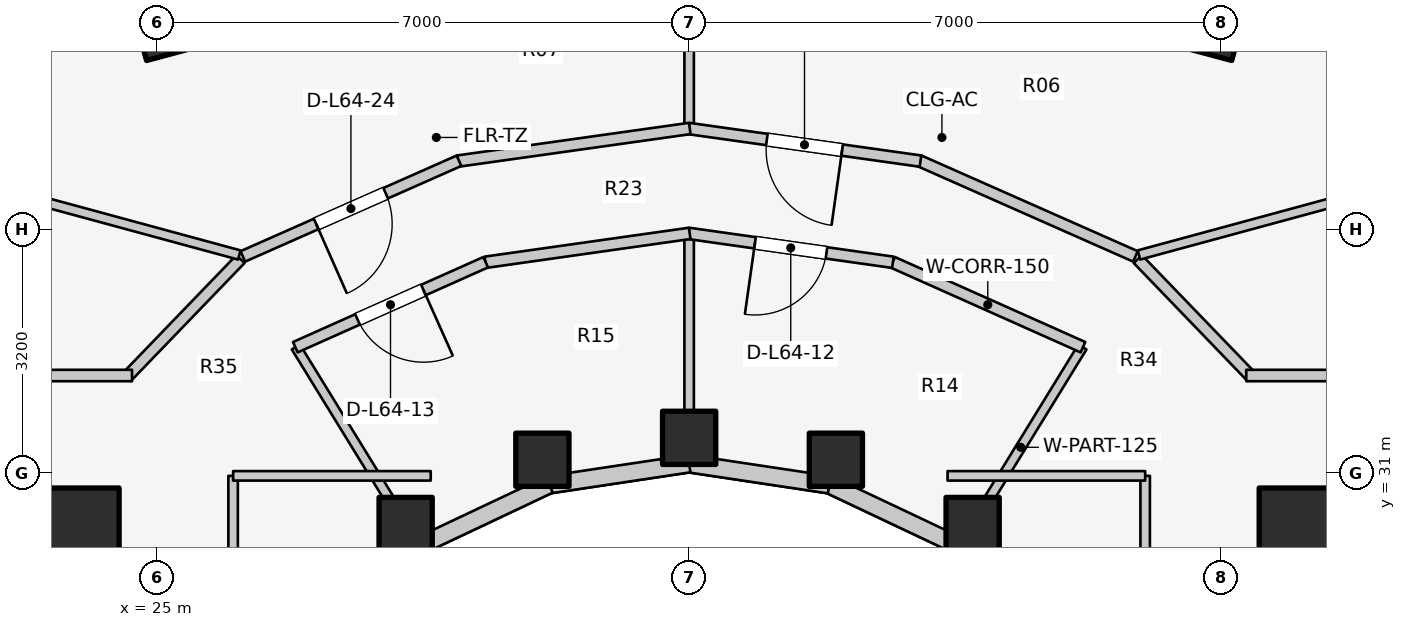
"""IFC4 building model, lengths in metres.
Left out: names, types, materials, properties, quantities, classifications, styles, units other than length and angle.
Written with IfcOpenShell. Run it as: python <this file> out.ifc"""

import sys

from ifc_helpers import new_model, si_unit, direction, frame, frame_2d, origin, origin_2d, place, context, subcontext, project, spatial, rectangle, extrude, element, fill, save


model = new_model("IFC4")
c1 = context("Model", 3, precision=1e-05, world=origin(), true_north=direction((0.0, 1.0)))
c2 = subcontext(c1, "Body", "Model", "MODEL_VIEW")
j1 = project(units=[si_unit("LENGTHUNIT", "METRE"), si_unit("PLANEANGLEUNIT", "RADIAN")], contexts=[c1])
p1 = place(None, origin())
s1 = spatial("IfcSite", under=j1, at=p1, CompositionType="ELEMENT")
p2 = place(p1, origin())
s2 = spatial("IfcBuilding", under=s1, at=p2, CompositionType="ELEMENT")
p3 = place(p2, frame((0.0, 0.0, 210.9)))
s3 = spatial("IfcBuildingStorey", under=s2, at=p3, CompositionType="ELEMENT", Elevation=210.9)
for number, where, z_axis, x_axis in (
    (1, (19.65, 30.35, 0.0), (0.0, 0.0, 1.0), (1.0, 0.0, 0.0)),
    (2, (39.85, 30.35, 0.0), (0.0, 0.0, 1.0), (1.0, 0.0, 0.0)),
):
    element("IfcWall", number, at=place(p3, frame(where, z_axis=z_axis, x_axis=x_axis)), inside=s3, PredefinedType="SHEAR", context=c2, shape_type="SweptSolid", body=[
        extrude(rectangle(XDim=4.5, YDim=0.55, at=frame_2d((2.25, 0.0))), origin(), (0.0, 0.0, 1.0), 3.1),
    ])
for number, where, z_axis, x_axis in (
    (3, (23.9, 30.2, 0.0), (0.0, 0.0, 1.0), (1.0, 0.0, 0.0)),
    (4, (40.1, 30.2, 0.0), (0.0, 0.0, 1.0), (1.0, 0.0, 0.0)),
):
    element("IfcColumn", number, at=place(p3, frame(where, z_axis=z_axis, x_axis=x_axis)), inside=s3, PredefinedType="COLUMN", context=c2, shape_type="SweptSolid", body=[
        extrude(rectangle(XDim=1.2, YDim=1.2, at=origin_2d()), origin(), (0.0, 0.0, 1.0), 3.1),
    ])
for number, where, z_axis, x_axis in (
    (5, (35.73, 30.327, 0.0), (0.0, 0.0, 1.0), (1.0, 0.0, 0.0)),
    (6, (33.931, 31.172, 0.0), (0.0, 0.0, 1.0), (1.0, 0.0, 0.0)),
):
    element("IfcColumn", number, at=place(p3, frame(where, z_axis=z_axis, x_axis=x_axis)), inside=s3, PredefinedType="COLUMN", context=c2, shape_type="SweptSolid", body=[
        extrude(rectangle(XDim=0.7, YDim=0.7, at=origin_2d()), origin(), (0.0, 0.0, 1.0), 3.1),
    ])
p4 = place(p3, frame((38.856, 36.914, 0.0), z_axis=(0.0, 0.0, 1.0), x_axis=(0.258819045103, 0.965925826289, 0.0)))
e7 = element("IfcColumn", 7, at=p4, inside=s3, PredefinedType="COLUMN", context=c2, shape_type="SweptSolid", body=[
    extrude(rectangle(XDim=0.8, YDim=0.8, at=origin_2d()), origin(), (0.0, 0.0, 1.0), 3.1),
])
for number, where, z_axis, x_axis in (
    (8, (32.0, 31.46, 0.0), (0.0, 0.0, 1.0), (1.0, 0.0, 0.0)),
    (9, (30.069, 31.172, 0.0), (0.0, 0.0, 1.0), (1.0, 0.0, 0.0)),
):
    element("IfcColumn", number, at=place(p3, frame(where, z_axis=z_axis, x_axis=x_axis)), inside=s3, PredefinedType="COLUMN", context=c2, shape_type="SweptSolid", body=[
        extrude(rectangle(XDim=0.7, YDim=0.7, at=origin_2d()), origin(), (0.0, 0.0, 1.0), 3.1),
    ])
p5 = place(p3, frame((25.144, 36.914, 0.0), z_axis=(0.0, 0.0, 1.0), x_axis=(-0.258819045103, 0.965925826289, 0.0)))
e10 = element("IfcColumn", 10, at=p5, inside=s3, PredefinedType="COLUMN", context=c2, shape_type="SweptSolid", body=[
    extrude(rectangle(XDim=0.8, YDim=0.8, at=origin_2d()), origin(), (0.0, 0.0, 1.0), 3.1),
])
p6 = place(p3, frame((28.27, 30.327, 0.0), z_axis=(0.0, 0.0, 1.0), x_axis=(1.0, 0.0, 0.0)))
e11 = element("IfcColumn", 11, at=p6, inside=s3, PredefinedType="COLUMN", context=c2, shape_type="SweptSolid", body=[
    extrude(rectangle(XDim=0.7, YDim=0.7, at=origin_2d()), origin(), (0.0, 0.0, 1.0), 3.1),
])
p7 = place(p3, frame((37.035, 28.742, 0.0), z_axis=(0.0, 0.0, 1.0), x_axis=(-0.752576694707, 0.658504607869, 0.0)))
e12 = element("IfcWall", 12, at=p7, inside=s3, PredefinedType="STANDARD", context=c2, shape_type="SweptSolid", body=[
    extrude(rectangle(XDim=1.959, YDim=0.23, at=frame_2d((0.98, 0.0))), origin(), (0.0, 0.0, 1.0), 2.16),
])
p8 = place(p3, frame((35.56, 30.032, 0.0), z_axis=(0.0, 0.0, 1.0), x_axis=(-0.904179699603, 0.427152280606, 0.0)))
e13 = element("IfcWall", 13, at=p8, inside=s3, PredefinedType="STANDARD", context=c2, shape_type="SweptSolid", body=[
    extrude(rectangle(XDim=1.899, YDim=0.23, at=frame_2d((0.95, 0.0))), origin(), (0.0, 0.0, 1.0), 2.16),
])
for number, where, z_axis, x_axis in (
    (14, (33.843, 30.843, 0.0), (0.0, 0.0, 1.0), (-0.989, 0.149, 0.0)),
    (15, (32.0, 31.12, 0.0), (0.0, 0.0, 1.0), (-0.989, -0.149, 0.0)),
):
    element("IfcWall", number, at=place(p3, frame(where, z_axis=z_axis, x_axis=x_axis)), inside=s3, PredefinedType="STANDARD", context=c2, shape_type="SweptSolid", body=[
        extrude(rectangle(XDim=1.864, YDim=0.23, at=frame_2d((0.932, 0.0))), origin(), (0.0, 0.0, 1.0), 2.16),
    ])
p9 = place(p3, frame((30.157, 30.843, 0.0), z_axis=(0.0, 0.0, 1.0), x_axis=(-0.904179699603, -0.427152280606, 0.0)))
e16 = element("IfcWall", 16, at=p9, inside=s3, PredefinedType="STANDARD", context=c2, shape_type="SweptSolid", body=[
    extrude(rectangle(XDim=1.899, YDim=0.23, at=frame_2d((0.95, 0.0))), origin(), (0.0, 0.0, 1.0), 2.16),
])
p10 = place(p3, frame((28.44, 30.032, 0.0), z_axis=(0.0, 0.0, 1.0), x_axis=(-0.752576694707, -0.658504607869, 0.0)))
e17 = element("IfcWall", 17, at=p10, inside=s3, PredefinedType="STANDARD", context=c2, shape_type="SweptSolid", body=[
    extrude(rectangle(XDim=1.959, YDim=0.23, at=frame_2d((0.98, 0.0))), origin(), (0.0, 0.0, 1.0), 2.16),
])
p11 = place(p3, frame((43.87, 36.177, 0.0), z_axis=(0.0, 0.0, 1.0), x_axis=(-0.965213026382, 0.261464746576, 0.0)))
e18 = element("IfcWall", 18, at=p11, inside=s3, PredefinedType="STANDARD", context=c2, shape_type="SweptSolid", body=[
    extrude(rectangle(XDim=5.001, YDim=0.26, at=frame_2d((2.5, 0.0))), origin(), (0.0, 0.0, 1.0), 2.85),
])
p12 = place(p11, frame((1.75, 0.0, 0.75)))
e19 = element("IfcOpeningElement", 19, at=p12, cuts=e18, PredefinedType="OPENING", context=c2, shape_type="SweptSolid", body=[
    extrude(rectangle(XDim=1.5, YDim=1.6, at=frame_2d((0.75, 0.8))), frame((0.0, 0.14, 0.0), z_axis=(0.0, -1.0, 0.0), x_axis=(1.0, 0.0, 0.0)), (0.0, 0.0, 1.0), 0.28),
])
p13 = place(p3, frame((24.957, 37.485, 0.0), z_axis=(0.0, 0.0, 1.0), x_axis=(-0.965213026382, -0.261464746576, 0.0)))
e20 = element("IfcWall", 20, at=p13, inside=s3, PredefinedType="STANDARD", context=c2, shape_type="SweptSolid", body=[
    extrude(rectangle(XDim=5.001, YDim=0.26, at=frame_2d((2.5, 0.0))), origin(), (0.0, 0.0, 1.0), 2.85),
])
p14 = place(p13, frame((1.75, 0.0, 0.75)))
e21 = element("IfcOpeningElement", 21, at=p14, cuts=e20, PredefinedType="OPENING", context=c2, shape_type="SweptSolid", body=[
    extrude(rectangle(XDim=1.5, YDim=1.6, at=frame_2d((0.75, 0.8))), frame((0.0, 0.14, 0.0), z_axis=(0.0, -1.0, 0.0), x_axis=(1.0, 0.0, 0.0)), (0.0, 0.0, 1.0), 0.28),
])
p15 = place(p3, frame((35.55, 30.015, 0.0), z_axis=(0.0, 0.0, 1.0), x_axis=(0.523992004803, 0.851723182086, 0.0)))
e22 = element("IfcWall", 22, at=p15, inside=s3, PredefinedType="PARTITIONING", context=c2, shape_type="SweptSolid", body=[
    extrude(rectangle(XDim=3.101, YDim=0.125, at=frame_2d((1.551, 0.0))), origin(), (0.0, 0.0, 1.0), 2.376),
])
p16 = place(p3, frame((32.0, 31.1, 0.0), z_axis=(0.0, 0.0, 1.0), x_axis=(0.0, 1.0, 0.0)))
e23 = element("IfcWall", 23, at=p16, inside=s3, PredefinedType="PARTITIONING", context=c2, shape_type="SweptSolid", body=[
    extrude(rectangle(XDim=3.05, YDim=0.125, at=frame_2d((1.525, 0.0))), origin(), (0.0, 0.0, 1.0), 2.376),
])
p17 = place(p3, frame((28.45, 30.015, 0.0), z_axis=(0.0, 0.0, 1.0), x_axis=(-0.523992004803, 0.851723182086, 0.0)))
e24 = element("IfcWall", 24, at=p17, inside=s3, PredefinedType="PARTITIONING", context=c2, shape_type="SweptSolid", body=[
    extrude(rectangle(XDim=3.101, YDim=0.125, at=frame_2d((1.551, 0.0))), origin(), (0.0, 0.0, 1.0), 2.376),
])
p18 = place(p3, frame((37.181, 32.652, 0.0), z_axis=(0.0, 0.0, 1.0), x_axis=(-0.913120130558, 0.407690602257, 0.0)))
e25 = element("IfcWall", 25, at=p18, inside=s3, PredefinedType="PARTITIONING", context=c2, shape_type="SweptSolid", body=[
    extrude(rectangle(XDim=2.743, YDim=0.15, at=frame_2d((1.371, 0.0))), origin(), (0.0, 0.0, 1.0), 2.376),
])
p19 = place(p3, frame((34.68, 33.77, 0.0), z_axis=(0.0, 0.0, 1.0), x_axis=(-0.990132151456, 0.140136799779, 0.0)))
e26 = element("IfcWall", 26, at=p19, inside=s3, PredefinedType="PARTITIONING", context=c2, shape_type="SweptSolid", body=[
    extrude(rectangle(XDim=2.714, YDim=0.15, at=frame_2d((1.357, 0.0))), origin(), (0.0, 0.0, 1.0), 2.376),
])
p20 = place(p19, frame((0.882, 0.0, 0.0)))
e27 = element("IfcOpeningElement", 27, at=p20, cuts=e26, PredefinedType="OPENING", context=c2, shape_type="SweptSolid", body=[
    extrude(rectangle(XDim=0.95, YDim=2.1, at=frame_2d((0.475, 1.05))), frame((0.0, 0.085, 0.0), z_axis=(0.0, -1.0, 0.0), x_axis=(1.0, 0.0, 0.0)), (0.0, 0.0, 1.0), 0.17),
])
p21 = place(p3, frame((32.007, 34.15, 0.0), z_axis=(0.0, 0.0, 1.0), x_axis=(-0.990132151456, -0.140136799779, 0.0)))
e28 = element("IfcWall", 28, at=p21, inside=s3, PredefinedType="PARTITIONING", context=c2, shape_type="SweptSolid", body=[
    extrude(rectangle(XDim=2.714, YDim=0.15, at=frame_2d((1.357, 0.0))), origin(), (0.0, 0.0, 1.0), 2.376),
])
p22 = place(p3, frame((29.323, 33.771, 0.0), z_axis=(0.0, 0.0, 1.0), x_axis=(-0.913120130558, -0.407690602257, 0.0)))
e29 = element("IfcWall", 29, at=p22, inside=s3, PredefinedType="PARTITIONING", context=c2, shape_type="SweptSolid", body=[
    extrude(rectangle(XDim=2.743, YDim=0.15, at=frame_2d((1.371, 0.0))), origin(), (0.0, 0.0, 1.0), 2.376),
])
p23 = place(p22, frame((0.896, 0.0, 0.0)))
e30 = element("IfcOpeningElement", 30, at=p23, cuts=e29, PredefinedType="OPENING", context=c2, shape_type="SweptSolid", body=[
    extrude(rectangle(XDim=0.95, YDim=2.1, at=frame_2d((0.475, 1.05))), frame((0.0, 0.085, 0.0), z_axis=(0.0, -1.0, 0.0), x_axis=(1.0, 0.0, 0.0)), (0.0, 0.0, 1.0), 0.17),
])
p24 = place(p3, frame((26.0, 25.8, 0.0), z_axis=(0.0, 0.0, 1.0), x_axis=(0.0, 1.0, 0.0)))
e31 = element("IfcWall", 31, at=p24, inside=s3, PredefinedType="PARTITIONING", context=c2, shape_type="SweptSolid", body=[
    extrude(rectangle(XDim=5.16, YDim=0.125, at=frame_2d((2.58, 0.0))), origin(), (0.0, 0.0, 1.0), 2.232),
])
p25 = place(p3, frame((26.0, 30.96, 0.0), z_axis=(0.0, 0.0, 1.0), x_axis=(1.0, 0.0, 0.0)))
e32 = element("IfcWall", 32, at=p25, inside=s3, PredefinedType="PARTITIONING", context=c2, shape_type="SweptSolid", body=[
    extrude(rectangle(XDim=2.6, YDim=0.125, at=frame_2d((1.3, 0.0))), origin(), (0.0, 0.0, 1.0), 2.376),
])
p26 = place(p3, frame((38.0, 25.8, 0.0), z_axis=(0.0, 0.0, 1.0), x_axis=(0.0, 1.0, 0.0)))
e33 = element("IfcWall", 33, at=p26, inside=s3, PredefinedType="PARTITIONING", context=c2, shape_type="SweptSolid", body=[
    extrude(rectangle(XDim=5.16, YDim=0.125, at=frame_2d((2.58, 0.0))), origin(), (0.0, 0.0, 1.0), 2.232),
])
p27 = place(p3, frame((35.4, 30.96, 0.0), z_axis=(0.0, 0.0, 1.0), x_axis=(1.0, 0.0, 0.0)))
e34 = element("IfcWall", 34, at=p27, inside=s3, PredefinedType="PARTITIONING", context=c2, shape_type="SweptSolid", body=[
    extrude(rectangle(XDim=2.6, YDim=0.125, at=frame_2d((1.3, 0.0))), origin(), (0.0, 0.0, 1.0), 2.376),
])
p28 = place(p3, frame((37.903, 33.812, 0.0), z_axis=(0.0, 0.0, 1.0), x_axis=(0.694032962553, -0.719943224768, 0.0)))
e35 = element("IfcWall", 35, at=p28, inside=s3, PredefinedType="PARTITIONING", context=c2, shape_type="SweptSolid", body=[
    extrude(rectangle(XDim=2.158, YDim=0.15, at=frame_2d((1.079, 0.0))), origin(), (0.0, 0.0, 1.0), 2.376),
])
p29 = place(p3, frame((39.33, 32.28, 0.0), z_axis=(0.0, 0.0, 1.0), x_axis=(1.0, 0.0, 0.0)))
e36 = element("IfcWall", 36, at=p29, inside=s3, PredefinedType="PARTITIONING", context=c2, shape_type="SweptSolid", body=[
    extrude(rectangle(XDim=7.52, YDim=0.15, at=frame_2d((3.76, 0.0))), origin(), (0.0, 0.0, 1.0), 2.376),
])
p30 = place(p29, frame((5.22, 0.0, 0.0)))
e37 = element("IfcOpeningElement", 37, at=p30, cuts=e36, PredefinedType="OPENING", context=c2, shape_type="SweptSolid", body=[
    extrude(rectangle(XDim=0.9, YDim=2.1, at=frame_2d((0.45, 1.05))), frame((0.0, 0.085, 0.0), z_axis=(0.0, -1.0, 0.0), x_axis=(1.0, 0.0, 0.0)), (0.0, 0.0, 1.0), 0.17),
])
p31 = place(p3, frame((26.097, 33.812, 0.0), z_axis=(0.0, 0.0, 1.0), x_axis=(-0.694032962553, -0.719943224768, 0.0)))
e38 = element("IfcWall", 38, at=p31, inside=s3, PredefinedType="PARTITIONING", context=c2, shape_type="SweptSolid", body=[
    extrude(rectangle(XDim=2.158, YDim=0.15, at=frame_2d((1.079, 0.0))), origin(), (0.0, 0.0, 1.0), 2.376),
])
p32 = place(p3, frame((17.15, 32.28, 0.0), z_axis=(0.0, 0.0, 1.0), x_axis=(1.0, 0.0, 0.0)))
e39 = element("IfcWall", 39, at=p32, inside=s3, PredefinedType="PARTITIONING", context=c2, shape_type="SweptSolid", body=[
    extrude(rectangle(XDim=7.52, YDim=0.15, at=frame_2d((3.76, 0.0))), origin(), (0.0, 0.0, 1.0), 2.376),
])
p33 = place(p32, frame((1.3, 0.0, 0.0)))
e40 = element("IfcOpeningElement", 40, at=p33, cuts=e39, PredefinedType="OPENING", context=c2, shape_type="SweptSolid", body=[
    extrude(rectangle(XDim=0.9, YDim=2.1, at=frame_2d((0.45, 1.05))), frame((0.0, 0.085, 0.0), z_axis=(0.0, -1.0, 0.0), x_axis=(1.0, 0.0, 0.0)), (0.0, 0.0, 1.0), 0.17),
])
p34 = place(p3, frame((37.918, 33.866, 0.0), z_axis=(0.0, 0.0, 1.0), x_axis=(0.965109390289, 0.261847025523, 0.0)))
e41 = element("IfcWall", 41, at=p34, inside=s3, PredefinedType="PARTITIONING", context=c2, shape_type="SweptSolid", body=[
    extrude(rectangle(XDim=5.644, YDim=0.125, at=frame_2d((2.822, 0.0))), origin(), (0.0, 0.0, 1.0), 2.376),
])
p35 = place(p3, frame((32.0, 35.585, 0.0), z_axis=(0.0, 0.0, 1.0), x_axis=(0.0, 1.0, 0.0)))
e42 = element("IfcWall", 42, at=p35, inside=s3, PredefinedType="PARTITIONING", context=c2, shape_type="SweptSolid", body=[
    extrude(rectangle(XDim=1.315, YDim=0.125, at=frame_2d((0.657, 0.0))), origin(), (0.0, 0.0, 1.0), 2.376),
])
p36 = place(p3, frame((26.082, 33.866, 0.0), z_axis=(0.0, 0.0, 1.0), x_axis=(-0.965109390289, 0.261847025523, 0.0)))
e43 = element("IfcWall", 43, at=p36, inside=s3, PredefinedType="PARTITIONING", context=c2, shape_type="SweptSolid", body=[
    extrude(rectangle(XDim=5.644, YDim=0.125, at=frame_2d((2.822, 0.0))), origin(), (0.0, 0.0, 1.0), 2.376),
])
p37 = place(p3, frame((37.872, 33.847, 0.0), z_axis=(0.0, 0.0, 1.0), x_axis=(-0.914490094652, 0.40460828808, 0.0)))
e44 = element("IfcWall", 44, at=p37, inside=s3, PredefinedType="PARTITIONING", context=c2, shape_type="SweptSolid", body=[
    extrude(rectangle(XDim=3.11, YDim=0.15, at=frame_2d((1.555, 0.0))), origin(), (0.0, 0.0, 1.0), 2.376),
])
p38 = place(p3, frame((35.044, 35.101, 0.0), z_axis=(0.0, 0.0, 1.0), x_axis=(-0.990257602807, 0.139247549651, 0.0)))
e45 = element("IfcWall", 45, at=p38, inside=s3, PredefinedType="PARTITIONING", context=c2, shape_type="SweptSolid", body=[
    extrude(rectangle(XDim=3.082, YDim=0.15, at=frame_2d((1.541, 0.0))), origin(), (0.0, 0.0, 1.0), 2.376),
])
p39 = place(p38, frame((1.041, 0.0, 0.0)))
e46 = element("IfcOpeningElement", 46, at=p39, cuts=e45, PredefinedType="OPENING", context=c2, shape_type="SweptSolid", body=[
    extrude(rectangle(XDim=1.0, YDim=2.1, at=frame_2d((0.5, 1.05))), frame((0.0, 0.085, 0.0), z_axis=(0.0, -1.0, 0.0), x_axis=(1.0, 0.0, 0.0)), (0.0, 0.0, 1.0), 0.17),
])
p40 = place(p3, frame((32.008, 35.53, 0.0), z_axis=(0.0, 0.0, 1.0), x_axis=(-0.990257602807, -0.139247549651, 0.0)))
e47 = element("IfcWall", 47, at=p40, inside=s3, PredefinedType="PARTITIONING", context=c2, shape_type="SweptSolid", body=[
    extrude(rectangle(XDim=3.082, YDim=0.15, at=frame_2d((1.541, 0.0))), origin(), (0.0, 0.0, 1.0), 2.376),
])
p41 = place(p3, frame((28.972, 35.105, 0.0), z_axis=(0.0, 0.0, 1.0), x_axis=(-0.914490094652, -0.40460828808, 0.0)))
e48 = element("IfcWall", 48, at=p41, inside=s3, PredefinedType="PARTITIONING", context=c2, shape_type="SweptSolid", body=[
    extrude(rectangle(XDim=3.11, YDim=0.15, at=frame_2d((1.555, 0.0))), origin(), (0.0, 0.0, 1.0), 2.376),
])
p42 = place(p41, frame((1.055, 0.0, 0.0)))
e49 = element("IfcOpeningElement", 49, at=p42, cuts=e48, PredefinedType="OPENING", context=c2, shape_type="SweptSolid", body=[
    extrude(rectangle(XDim=1.0, YDim=2.1, at=frame_2d((0.5, 1.05))), frame((0.0, 0.085, 0.0), z_axis=(0.0, -1.0, 0.0), x_axis=(1.0, 0.0, 0.0)), (0.0, 0.0, 1.0), 0.17),
])
p43 = place(p20, origin())
e50 = element("IfcDoor", 50, at=p43, inside=s3, OperationType="SINGLE_SWING_RIGHT", PredefinedType="DOOR", context=c2, shape_type="SweptSolid", body=[
    extrude(rectangle(XDim=0.95, YDim=2.1, at=frame_2d((0.475, 1.05))), frame((0.0, 0.025, 0.0), z_axis=(0.0, -1.0, 0.0), x_axis=(1.0, 0.0, 0.0)), (0.0, 0.0, 1.0), 0.05),
])
fill(e27, e50)
p44 = place(p23, origin())
e51 = element("IfcDoor", 51, at=p44, inside=s3, OperationType="SINGLE_SWING_LEFT", PredefinedType="DOOR", context=c2, shape_type="SweptSolid", body=[
    extrude(rectangle(XDim=0.95, YDim=2.1, at=frame_2d((0.475, 1.05))), frame((0.0, 0.025, 0.0), z_axis=(0.0, -1.0, 0.0), x_axis=(1.0, 0.0, 0.0)), (0.0, 0.0, 1.0), 0.05),
])
fill(e30, e51)
p45 = place(p39, origin())
e52 = element("IfcDoor", 52, at=p45, inside=s3, OperationType="SINGLE_SWING_LEFT", PredefinedType="DOOR", context=c2, shape_type="SweptSolid", body=[
    extrude(rectangle(XDim=1.0, YDim=2.1, at=frame_2d((0.5, 1.05))), frame((0.0, 0.025, 0.0), z_axis=(0.0, -1.0, 0.0), x_axis=(1.0, 0.0, 0.0)), (0.0, 0.0, 1.0), 0.05),
])
fill(e46, e52)
p46 = place(p42, origin())
e53 = element("IfcDoor", 53, at=p46, inside=s3, OperationType="SINGLE_SWING_RIGHT", PredefinedType="DOOR", context=c2, shape_type="SweptSolid", body=[
    extrude(rectangle(XDim=1.0, YDim=2.1, at=frame_2d((0.5, 1.05))), frame((0.0, 0.025, 0.0), z_axis=(0.0, -1.0, 0.0), x_axis=(1.0, 0.0, 0.0)), (0.0, 0.0, 1.0), 0.05),
])
fill(e49, e53)
save(model, sys.argv[1])
